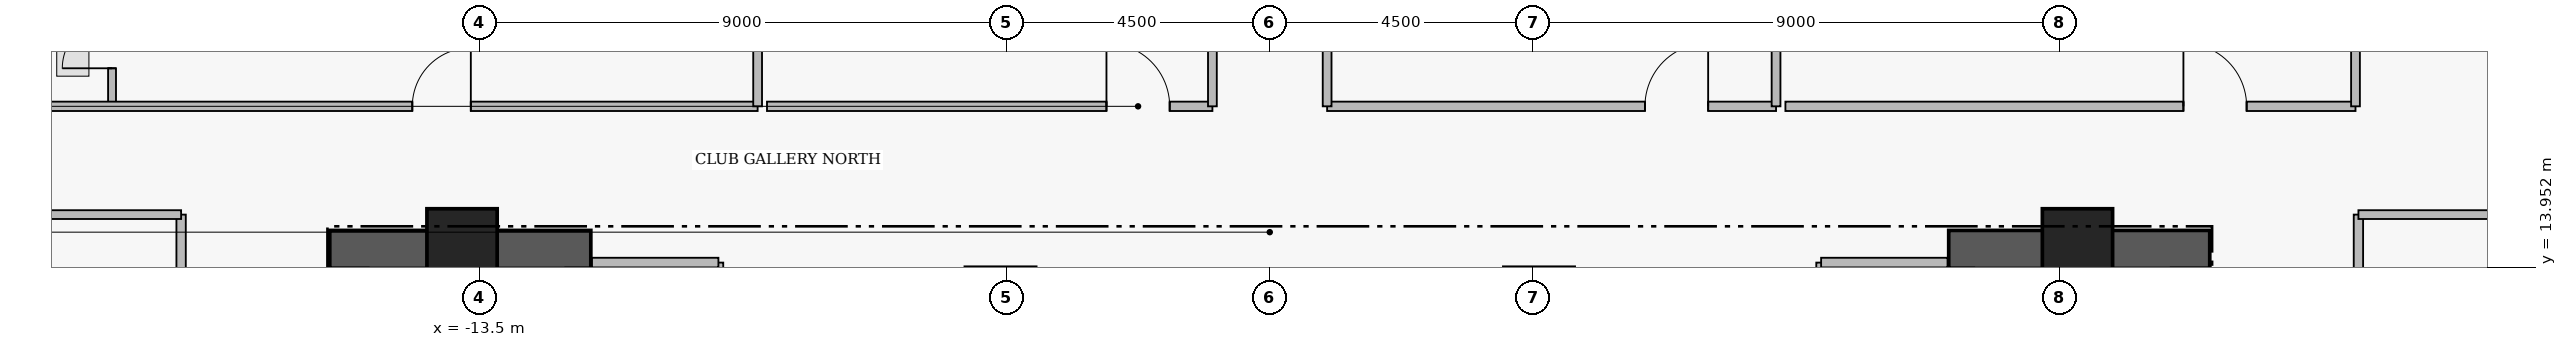
"""IFC4 building model, lengths in metres.
Left out: names, types, materials, properties, quantities, classifications, styles, units other than length and angle.
Written with IfcOpenShell. Run it as: python <this file> out.ifc"""

import sys

from ifc_helpers import new_model, si_unit, direction, frame, frame_2d, origin, origin_2d, place, context, subcontext, project, spatial, rectangle, extrude, element, fill, save


model = new_model("IFC4")
c1 = context("Model", 3, precision=1e-05, world=origin(), true_north=direction((0.0, 1.0)))
c2 = subcontext(c1, "Body", "Model", "MODEL_VIEW")
j1 = project(units=[si_unit("LENGTHUNIT", "METRE"), si_unit("PLANEANGLEUNIT", "RADIAN")], contexts=[c1])
p1 = place(None, origin())
s1 = spatial("IfcSite", under=j1, at=p1, CompositionType="ELEMENT")
p2 = place(p1, origin())
s2 = spatial("IfcBuilding", under=s1, at=p2, CompositionType="ELEMENT")
p3 = place(p2, frame((0.0, 0.0, 188.65)))
s3 = spatial("IfcBuildingStorey", under=s2, at=p3, CompositionType="ELEMENT", Elevation=188.65)
for number, where, z_axis, x_axis in (
    (1, (-16.06, 14.255, 0.0), (0.0, 0.0, 1.0), (1.0, 0.0, 0.0)),
    (2, (11.6, 14.255, 0.0), (0.0, 0.0, 1.0), (1.0, 0.0, 0.0)),
):
    element("IfcWall", number, at=place(p3, frame(where, z_axis=z_axis, x_axis=x_axis)), inside=s3, PredefinedType="SHEAR", context=c2, shape_type="SweptSolid", body=[
        extrude(rectangle(XDim=4.46, YDim=0.65, at=frame_2d((2.23, 0.0))), origin(), (0.0, 0.0, 1.0), 3.56),
    ])
for number, where, z_axis, x_axis in (
    (3, (-13.8, 14.35, 0.0), (0.0, 0.0, 1.0), (1.0, 0.0, 0.0)),
    (4, (-4.6, 13.35, 0.0), (0.0, 0.0, 1.0), (1.0, 0.0, 0.0)),
    (5, (4.6, 13.35, 0.0), (0.0, 0.0, 1.0), (1.0, 0.0, 0.0)),
    (6, (13.8, 14.35, 0.0), (0.0, 0.0, 1.0), (1.0, 0.0, 0.0)),
):
    element("IfcColumn", number, at=place(p3, frame(where, z_axis=z_axis, x_axis=x_axis)), inside=s3, PredefinedType="COLUMN", context=c2, shape_type="SweptSolid", body=[
        extrude(rectangle(XDim=1.2, YDim=1.2, at=origin_2d()), origin(), (0.0, 0.0, 1.0), 3.75),
    ])
p4 = place(p3, frame((-19.78, 16.7, 0.0), z_axis=(0.0, 0.0, 1.0), x_axis=(0.0, 1.0, 0.0)))
e7 = element("IfcWall", 7, at=p4, inside=s3, PredefinedType="PLUMBINGWALL", context=c2, shape_type="SweptSolid", body=[
    extrude(rectangle(XDim=2.36, YDim=0.135, at=frame_2d((1.18, 0.0))), origin(), (0.0, 0.0, 1.0), 3.53),
])
p5 = place(p4, frame((0.65, 0.0, 0.0)))
e8 = element("IfcOpeningElement", 8, at=p5, cuts=e7, PredefinedType="OPENING", context=c2, shape_type="SweptSolid", body=[
    extrude(rectangle(XDim=0.85, YDim=2.1, at=frame_2d((0.425, 1.05))), frame((0.0, 0.077, 0.0), z_axis=(0.0, -1.0, 0.0), x_axis=(1.0, 0.0, 0.0)), (0.0, 0.0, 1.0), 0.155),
])
p6 = place(p3, frame((-22.04, 16.7, 0.0), z_axis=(0.0, 0.0, 1.0), x_axis=(1.0, 0.0, 0.0)))
e9 = element("IfcWall", 9, at=p6, inside=s3, PredefinedType="PARTITIONING", context=c2, shape_type="SweptSolid", body=[
    extrude(rectangle(XDim=13.29, YDim=0.16, at=frame_2d((6.645, 0.0))), origin(), (0.0, 0.0, 1.0), 3.124),
])
p7 = place(p6, frame((7.39, 0.0, 0.0)))
e10 = element("IfcOpeningElement", 10, at=p7, cuts=e9, PredefinedType="OPENING", context=c2, shape_type="SweptSolid", body=[
    extrude(rectangle(XDim=1.0, YDim=2.15, at=frame_2d((0.5, 1.075))), frame((0.0, 0.09, 0.0), z_axis=(0.0, -1.0, 0.0), x_axis=(1.0, 0.0, 0.0)), (0.0, 0.0, 1.0), 0.18),
])
p8 = place(p3, frame((-8.59, 16.7, 0.0), z_axis=(0.0, 0.0, 1.0), x_axis=(1.0, 0.0, 0.0)))
e11 = element("IfcWall", 11, at=p8, inside=s3, PredefinedType="PARTITIONING", context=c2, shape_type="SweptSolid", body=[
    extrude(rectangle(XDim=7.61, YDim=0.16, at=frame_2d((3.805, 0.0))), origin(), (0.0, 0.0, 1.0), 3.124),
])
p9 = place(p8, frame((5.8, 0.0, 0.0)))
e12 = element("IfcOpeningElement", 12, at=p9, cuts=e11, PredefinedType="OPENING", context=c2, shape_type="SweptSolid", body=[
    extrude(rectangle(XDim=1.08, YDim=2.18, at=frame_2d((0.54, 1.09))), frame((0.0, 0.09, 0.0), z_axis=(0.0, -1.0, 0.0), x_axis=(1.0, 0.0, 0.0)), (0.0, 0.0, 1.0), 0.18),
])
p10 = place(p3, frame((0.98, 16.7, 0.0), z_axis=(0.0, 0.0, 1.0), x_axis=(1.0, 0.0, 0.0)))
e13 = element("IfcWall", 13, at=p10, inside=s3, PredefinedType="PARTITIONING", context=c2, shape_type="SweptSolid", body=[
    extrude(rectangle(XDim=7.67, YDim=0.16, at=frame_2d((3.835, 0.0))), origin(), (0.0, 0.0, 1.0), 3.124),
])
p11 = place(p10, frame((5.43, 0.0, 0.0)))
e14 = element("IfcOpeningElement", 14, at=p11, cuts=e13, PredefinedType="OPENING", context=c2, shape_type="SweptSolid", body=[
    extrude(rectangle(XDim=1.08, YDim=2.18, at=frame_2d((0.54, 1.09))), frame((0.0, 0.09, 0.0), z_axis=(0.0, -1.0, 0.0), x_axis=(1.0, 0.0, 0.0)), (0.0, 0.0, 1.0), 0.18),
])
p12 = place(p3, frame((8.81, 16.7, 0.0), z_axis=(0.0, 0.0, 1.0), x_axis=(1.0, 0.0, 0.0)))
e15 = element("IfcWall", 15, at=p12, inside=s3, PredefinedType="PARTITIONING", context=c2, shape_type="SweptSolid", body=[
    extrude(rectangle(XDim=9.74, YDim=0.16, at=frame_2d((4.87, 0.0))), origin(), (0.0, 0.0, 1.0), 3.124),
])
p13 = place(p12, frame((6.8, 0.0, 0.0)))
e16 = element("IfcOpeningElement", 16, at=p13, cuts=e15, PredefinedType="OPENING", context=c2, shape_type="SweptSolid", body=[
    extrude(rectangle(XDim=1.08, YDim=2.18, at=frame_2d((0.54, 1.09))), frame((0.0, 0.09, 0.0), z_axis=(0.0, -1.0, 0.0), x_axis=(1.0, 0.0, 0.0)), (0.0, 0.0, 1.0), 0.18),
])
p14 = place(p3, frame((18.6, 6.91, 0.0), z_axis=(0.0, 0.0, 1.0), x_axis=(0.0, 1.0, 0.0)))
e17 = element("IfcWall", 17, at=p14, inside=s3, PredefinedType="PARTITIONING", context=c2, shape_type="SweptSolid", body=[
    extrude(rectangle(XDim=7.94, YDim=0.16, at=frame_2d((3.97, 0.0))), origin(), (0.0, 0.0, 1.0), 3.53),
])
p15 = place(p14, frame((3.51, 0.0, 0.0)))
e18 = element("IfcOpeningElement", 18, at=p15, cuts=e17, PredefinedType="OPENING", context=c2, shape_type="SweptSolid", body=[
    extrude(rectangle(XDim=0.92, YDim=2.12, at=frame_2d((0.46, 1.06))), frame((0.0, 0.09, 0.0), z_axis=(0.0, -1.0, 0.0), x_axis=(1.0, 0.0, 0.0)), (0.0, 0.0, 1.0), 0.18),
])
p16 = place(p3, frame((-18.6, 10.18, 0.0), z_axis=(0.0, 0.0, 1.0), x_axis=(0.0, 1.0, 0.0)))
e19 = element("IfcWall", 19, at=p16, inside=s3, PredefinedType="PARTITIONING", context=c2, shape_type="SweptSolid", body=[
    extrude(rectangle(XDim=4.67, YDim=0.16, at=frame_2d((2.335, 0.0))), origin(), (0.0, 0.0, 1.0), 3.53),
])
p17 = place(p16, frame((1.86, 0.0, 0.0)))
e20 = element("IfcOpeningElement", 20, at=p17, cuts=e19, PredefinedType="OPENING", context=c2, shape_type="SweptSolid", body=[
    extrude(rectangle(XDim=0.95, YDim=2.15, at=frame_2d((0.475, 1.075))), frame((0.0, 0.09, 0.0), z_axis=(0.0, -1.0, 0.0), x_axis=(1.0, 0.0, 0.0)), (0.0, 0.0, 1.0), 0.18),
])
p18 = place(p3, frame((-9.42, 11.07, 0.0), z_axis=(0.0, 0.0, 1.0), x_axis=(0.0, 1.0, 0.0)))
e21 = element("IfcWall", 21, at=p18, inside=s3, PredefinedType="PARTITIONING", context=c2, shape_type="SweptSolid", body=[
    extrude(rectangle(XDim=2.96, YDim=0.165, at=frame_2d((1.48, 0.0))), origin(), (0.0, 0.0, 1.0), 3.53),
])
p19 = place(p3, frame((-11.58, 14.03, 0.0), z_axis=(0.0, 0.0, 1.0), x_axis=(1.0, 0.0, 0.0)))
e22 = element("IfcWall", 22, at=p19, inside=s3, PredefinedType="PARTITIONING", context=c2, shape_type="SweptSolid", body=[
    extrude(rectangle(XDim=2.16, YDim=0.165, at=frame_2d((1.08, 0.0))), origin(), (0.0, 0.0, 1.0), 3.53),
])
p20 = place(p3, frame((9.42, 11.07, 0.0), z_axis=(0.0, 0.0, 1.0), x_axis=(0.0, 1.0, 0.0)))
e23 = element("IfcWall", 23, at=p20, inside=s3, PredefinedType="PARTITIONING", context=c2, shape_type="SweptSolid", body=[
    extrude(rectangle(XDim=2.96, YDim=0.165, at=frame_2d((1.48, 0.0))), origin(), (0.0, 0.0, 1.0), 3.53),
])
p21 = place(p3, frame((9.42, 14.03, 0.0), z_axis=(0.0, 0.0, 1.0), x_axis=(1.0, 0.0, 0.0)))
e24 = element("IfcWall", 24, at=p21, inside=s3, PredefinedType="PARTITIONING", context=c2, shape_type="SweptSolid", body=[
    extrude(rectangle(XDim=2.16, YDim=0.165, at=frame_2d((1.08, 0.0))), origin(), (0.0, 0.0, 1.0), 3.53),
])
for number, where, z_axis, x_axis in (
    (25, (-8.75, 16.7, 0.0), (0.0, 0.0, 1.0), (0.0, 1.0, 0.0)),
    (26, (-0.98, 16.7, 0.0), (0.0, 0.0, 1.0), (0.0, 1.0, 0.0)),
    (27, (0.98, 16.7, 0.0), (0.0, 0.0, 1.0), (0.0, 1.0, 0.0)),
    (28, (8.65, 16.7, 0.0), (0.0, 0.0, 1.0), (0.0, 1.0, 0.0)),
    (29, (18.55, 16.7, 0.0), (0.0, 0.0, 1.0), (0.0, 1.0, 0.0)),
):
    element("IfcWall", number, at=place(p3, frame(where, z_axis=z_axis, x_axis=x_axis)), inside=s3, PredefinedType="PARTITIONING", context=c2, shape_type="SweptSolid", body=[
        extrude(rectangle(XDim=8.3, YDim=0.15, at=frame_2d((4.15, 0.0))), origin(), (0.0, 0.0, 1.0), 3.53),
    ])
for number, where, z_axis, x_axis in (
    (30, (18.6, 14.85, 0.0), (0.0, 0.0, 1.0), (1.0, 0.0, 0.0)),
    (31, (-23.638, 14.85, 0.0), (0.0, 0.0, 1.0), (1.0, 0.0, 0.0)),
):
    element("IfcWall", number, at=place(p3, frame(where, z_axis=z_axis, x_axis=x_axis)), inside=s3, PredefinedType="PARTITIONING", context=c2, shape_type="SweptSolid", body=[
        extrude(rectangle(XDim=5.038, YDim=0.15, at=frame_2d((2.519, 0.0))), origin(), (0.0, 0.0, 1.0), 3.53),
    ])
p22 = place(p5, origin())
e32 = element("IfcDoor", 32, at=p22, inside=s3, OperationType="SINGLE_SWING_LEFT", PredefinedType="DOOR", context=c2, shape_type="SweptSolid", body=[
    extrude(rectangle(XDim=0.85, YDim=2.1, at=frame_2d((0.425, 1.05))), frame((0.0, 0.025, 0.0), z_axis=(0.0, -1.0, 0.0), x_axis=(1.0, 0.0, 0.0)), (0.0, 0.0, 1.0), 0.05),
])
fill(e8, e32)
p23 = place(p7, origin())
e33 = element("IfcDoor", 33, at=p23, inside=s3, OperationType="SINGLE_SWING_RIGHT", PredefinedType="DOOR", context=c2, shape_type="SweptSolid", body=[
    extrude(rectangle(XDim=1.0, YDim=2.15, at=frame_2d((0.5, 1.075))), frame((0.0, 0.025, 0.0), z_axis=(0.0, -1.0, 0.0), x_axis=(1.0, 0.0, 0.0)), (0.0, 0.0, 1.0), 0.05),
])
fill(e10, e33)
p24 = place(p9, origin())
e34 = element("IfcDoor", 34, at=p24, inside=s3, OperationType="SINGLE_SWING_LEFT", PredefinedType="DOOR", context=c2, shape_type="SweptSolid", body=[
    extrude(rectangle(XDim=1.08, YDim=2.18, at=frame_2d((0.54, 1.09))), frame((0.0, 0.025, 0.0), z_axis=(0.0, -1.0, 0.0), x_axis=(1.0, 0.0, 0.0)), (0.0, 0.0, 1.0), 0.05),
])
fill(e12, e34)
p25 = place(p11, origin())
e35 = element("IfcDoor", 35, at=p25, inside=s3, OperationType="SINGLE_SWING_RIGHT", PredefinedType="DOOR", context=c2, shape_type="SweptSolid", body=[
    extrude(rectangle(XDim=1.08, YDim=2.18, at=frame_2d((0.54, 1.09))), frame((0.0, 0.025, 0.0), z_axis=(0.0, -1.0, 0.0), x_axis=(1.0, 0.0, 0.0)), (0.0, 0.0, 1.0), 0.05),
])
fill(e14, e35)
p26 = place(p13, origin())
e36 = element("IfcDoor", 36, at=p26, inside=s3, OperationType="SINGLE_SWING_LEFT", PredefinedType="DOOR", context=c2, shape_type="SweptSolid", body=[
    extrude(rectangle(XDim=1.08, YDim=2.18, at=frame_2d((0.54, 1.09))), frame((0.0, 0.025, 0.0), z_axis=(0.0, -1.0, 0.0), x_axis=(1.0, 0.0, 0.0)), (0.0, 0.0, 1.0), 0.05),
])
fill(e16, e36)
save(model, sys.argv[1])
